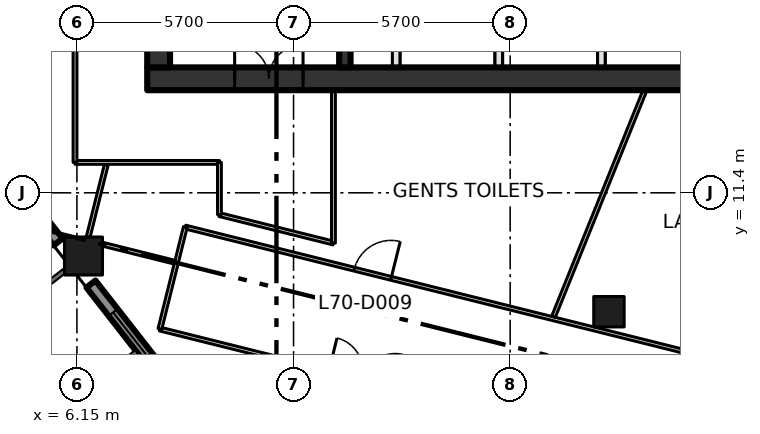
"""IFC4 building model, lengths in metres.
Left out: names, types, materials, properties, quantities, classifications, styles, units other than length and angle.
Written with IfcOpenShell. Run it as: python <this file> out.ifc"""

import sys

from ifc_helpers import new_model, si_unit, direction, frame, frame_2d, origin, origin_2d, place, context, subcontext, project, spatial, rectangle, extrude, element, fill, save


model = new_model("IFC4")
c1 = context("Model", 3, precision=1e-05, world=origin(), true_north=direction((0.0, 1.0)))
c2 = subcontext(c1, "Body", "Model", "MODEL_VIEW")
j1 = project(units=[si_unit("LENGTHUNIT", "METRE"), si_unit("PLANEANGLEUNIT", "RADIAN")], contexts=[c1])
p1 = place(None, origin())
s1 = spatial("IfcSite", under=j1, at=p1, CompositionType="ELEMENT")
p2 = place(p1, origin())
s2 = spatial("IfcBuilding", under=s1, at=p2, CompositionType="ELEMENT")
p3 = place(p2, frame((0.0, 0.0, 306.6)))
s3 = spatial("IfcBuildingStorey", under=s2, at=p3, CompositionType="ELEMENT", Elevation=306.6)
p4 = place(p3, frame((6.323, 9.737, 0.0), z_axis=(0.0, 0.0, 1.0), x_axis=(1.0, 0.0, 0.0)))
e1 = element("IfcColumn", 1, at=p4, inside=s3, PredefinedType="COLUMN", context=c2, shape_type="SweptSolid", body=[
    extrude(rectangle(XDim=1.0, YDim=1.0, at=origin_2d()), origin(), (0.0, 0.0, 1.0), 4.2),
])
p5 = place(p3, frame((20.149, 8.271, 0.0), z_axis=(0.0, 0.0, 1.0), x_axis=(1.0, 0.0, 0.0)))
e2 = element("IfcColumn", 2, at=p5, inside=s3, PredefinedType="COLUMN", context=c2, shape_type="SweptSolid", body=[
    extrude(rectangle(XDim=0.8, YDim=0.8, at=origin_2d()), origin(), (0.0, 0.0, 1.0), 4.2),
])
p6 = place(p3, frame((8.0, 14.4, -0.3), z_axis=(0.0, 0.0, 1.0), x_axis=(1.0, 0.0, 0.0)))
e3 = element("IfcWall", 3, at=p6, inside=s3, PredefinedType="SHEAR", context=c2, shape_type="SweptSolid", body=[
    extrude(rectangle(XDim=22.8, YDim=0.6, at=frame_2d((11.4, 0.0))), origin(), (0.0, 0.0, 1.0), 4.2),
])
p7 = place(p6, frame((2.3, 0.0, 0.3)))
e4 = element("IfcOpeningElement", 4, at=p7, cuts=e3, PredefinedType="OPENING", context=c2, shape_type="SweptSolid", body=[
    extrude(rectangle(XDim=1.8, YDim=2.1, at=frame_2d((0.9, 1.05))), frame((0.0, 0.31, 0.0), z_axis=(0.0, -1.0, 0.0), x_axis=(1.0, 0.0, 0.0)), (0.0, 0.0, 1.0), 0.62),
])
p8 = place(p3, frame((8.3, 14.7, -0.3), z_axis=(0.0, 0.0, 1.0), x_axis=(0.0, 1.0, 0.0)))
e5 = element("IfcWall", 5, at=p8, inside=s3, PredefinedType="SHEAR", context=c2, shape_type="SweptSolid", body=[
    extrude(rectangle(XDim=21.0, YDim=0.6, at=frame_2d((10.5, 0.0))), origin(), (0.0, 0.0, 1.0), 4.2),
])
p9 = place(p3, frame((13.2, 14.7, 0.0), z_axis=(0.0, 0.0, 1.0), x_axis=(0.0, 1.0, 0.0)))
e6 = element("IfcWall", 6, at=p9, inside=s3, PredefinedType="SHEAR", context=c2, shape_type="SweptSolid", body=[
    extrude(rectangle(XDim=21.0, YDim=0.3, at=frame_2d((10.5, 0.0))), origin(), (0.0, 0.0, 1.0), 3.9),
])
p10 = place(p9, frame((3.6, 0.0, 0.0)))
e7 = element("IfcOpeningElement", 7, at=p10, cuts=e6, PredefinedType="OPENING", context=c2, shape_type="SweptSolid", body=[
    extrude(rectangle(XDim=1.8, YDim=2.1, at=frame_2d((0.9, 1.05))), frame((0.0, 0.16, 0.0), z_axis=(0.0, -1.0, 0.0), x_axis=(1.0, 0.0, 0.0)), (0.0, 0.0, 1.0), 0.32),
])
p11 = place(p9, frame((11.7, 0.0, 0.0)))
e8 = element("IfcOpeningElement", 8, at=p11, cuts=e6, PredefinedType="OPENING", context=c2, shape_type="SweptSolid", body=[
    extrude(rectangle(XDim=1.2, YDim=2.1, at=frame_2d((0.6, 1.05))), frame((0.0, 0.16, 0.0), z_axis=(0.0, -1.0, 0.0), x_axis=(1.0, 0.0, 0.0)), (0.0, 0.0, 1.0), 0.32),
])
for number, where, z_axis, x_axis in (
    (9, (14.55, 14.7, 0.0), (0.0, 0.0, 1.0), (0.0, 1.0, 0.0)),
    (10, (17.25, 14.7, 0.0), (0.0, 0.0, 1.0), (0.0, 1.0, 0.0)),
    (11, (19.95, 14.7, 0.0), (0.0, 0.0, 1.0), (0.0, 1.0, 0.0)),
):
    element("IfcWall", number, at=place(p3, frame(where, z_axis=z_axis, x_axis=x_axis)), inside=s3, PredefinedType="SOLIDWALL", context=c2, shape_type="SweptSolid", body=[
        extrude(rectangle(XDim=2.9, YDim=0.2, at=frame_2d((1.45, 0.0))), origin(), (0.0, 0.0, 1.0), 3.9),
    ])
p12 = place(p3, frame((3.01, 13.491, 0.0), z_axis=(0.0, 0.0, 1.0), x_axis=(0.615713519567, -0.787970089421, 0.0)))
e12 = element("IfcWall", 12, at=p12, inside=s3, PredefinedType="SOLIDWALL", context=c2, shape_type="SweptSolid", body=[
    extrude(rectangle(XDim=4.296, YDim=0.3, at=frame_2d((2.148, 0.0))), origin(), (0.0, 0.0, 1.0), 3.2),
])
p13 = place(p12, frame((0.948, 0.0, 0.8)))
e13 = element("IfcOpeningElement", 13, at=p13, cuts=e12, PredefinedType="OPENING", context=c2, shape_type="SweptSolid", body=[
    extrude(rectangle(XDim=2.4, YDim=2.1, at=frame_2d((1.2, 1.05))), frame((0.0, 0.16, 0.0), z_axis=(0.0, -1.0, 0.0), x_axis=(1.0, 0.0, 0.0)), (0.0, 0.0, 1.0), 0.32),
])
p14 = place(p3, frame((6.519, 9.0, 0.0), z_axis=(0.0, 0.0, 1.0), x_axis=(0.615634121154, -0.788032124263, 0.0)))
e14 = element("IfcWall", 14, at=p14, inside=s3, PredefinedType="SOLIDWALL", context=c2, shape_type="SweptSolid", body=[
    extrude(rectangle(XDim=4.298, YDim=0.3, at=frame_2d((2.149, 0.0))), origin(), (0.0, 0.0, 1.0), 3.2),
])
p15 = place(p14, frame((0.949, 0.0, 0.8)))
e15 = element("IfcOpeningElement", 15, at=p15, cuts=e14, PredefinedType="OPENING", context=c2, shape_type="SweptSolid", body=[
    extrude(rectangle(XDim=2.4, YDim=2.1, at=frame_2d((1.2, 1.05))), frame((0.0, 0.16, 0.0), z_axis=(0.0, -1.0, 0.0), x_axis=(1.0, 0.0, 0.0)), (0.0, 0.0, 1.0), 0.32),
])
p16 = place(p3, frame((6.1, 12.2, 0.0), z_axis=(0.0, 0.0, 1.0), x_axis=(1.0, 0.0, 0.0)))
e16 = element("IfcWall", 16, at=p16, inside=s3, PredefinedType="PARTITIONING", context=c2, shape_type="SweptSolid", body=[
    extrude(rectangle(XDim=3.8, YDim=0.1, at=frame_2d((1.9, 0.0))), origin(), (0.0, 0.0, 1.0), 3.9),
])
p17 = place(p3, frame((6.1, 38.9, 0.0), z_axis=(0.0, 0.0, 1.0), x_axis=(0.0, -1.0, 0.0)))
e17 = element("IfcWall", 17, at=p17, inside=s3, PredefinedType="PARTITIONING", context=c2, shape_type="SweptSolid", body=[
    extrude(rectangle(XDim=26.7, YDim=0.1, at=frame_2d((13.35, 0.0))), origin(), (0.0, 0.0, 1.0), 3.9),
])
p18 = place(p17, frame((20.636, 0.0, 0.0)))
e18 = element("IfcOpeningElement", 18, at=p18, cuts=e17, PredefinedType="OPENING", context=c2, shape_type="SweptSolid", body=[
    extrude(rectangle(XDim=1.0, YDim=2.1, at=frame_2d((0.5, 1.05))), frame((0.0, 0.06, 0.0), z_axis=(0.0, -1.0, 0.0), x_axis=(1.0, 0.0, 0.0)), (0.0, 0.0, 1.0), 0.12),
])
p19 = place(p17, frame((6.88, 0.0, 0.0)))
e19 = element("IfcOpeningElement", 19, at=p19, cuts=e17, PredefinedType="OPENING", context=c2, shape_type="SweptSolid", body=[
    extrude(rectangle(XDim=1.8, YDim=2.1, at=frame_2d((0.9, 1.05))), frame((0.0, 0.06, 0.0), z_axis=(0.0, -1.0, 0.0), x_axis=(1.0, 0.0, 0.0)), (0.0, 0.0, 1.0), 0.12),
])
p20 = place(p3, frame((8.333, 7.815, 0.0), z_axis=(0.0, 0.0, 1.0), x_axis=(0.970306508913, -0.241878644697, 0.0)))
e20 = element("IfcWall", 20, at=p20, inside=s3, PredefinedType="PARTITIONING", context=c2, shape_type="SweptSolid", body=[
    extrude(rectangle(XDim=11.018, YDim=0.1, at=frame_2d((5.509, 0.0))), origin(), (0.0, 0.0, 1.0), 3.9),
])
p21 = place(p20, frame((4.58, 0.0, 0.0)))
e21 = element("IfcOpeningElement", 21, at=p21, cuts=e20, PredefinedType="OPENING", context=c2, shape_type="SweptSolid", body=[
    extrude(rectangle(XDim=1.8, YDim=2.1, at=frame_2d((0.9, 1.05))), frame((0.0, 0.06, 0.0), z_axis=(0.0, -1.0, 0.0), x_axis=(1.0, 0.0, 0.0)), (0.0, 0.0, 1.0), 0.12),
])
p22 = place(p3, frame((9.002, 10.499, 0.0), z_axis=(0.0, 0.0, 1.0), x_axis=(0.970298340477, -0.241911410372, 0.0)))
e22 = element("IfcWall", 22, at=p22, inside=s3, PredefinedType="PARTITIONING", context=c2, shape_type="SweptSolid", body=[
    extrude(rectangle(XDim=19.88, YDim=0.1, at=frame_2d((9.94, 0.0))), origin(), (0.0, 0.0, 1.0), 3.9),
])
p23 = place(p22, frame((4.58, 0.0, 0.0)))
e23 = element("IfcOpeningElement", 23, at=p23, cuts=e22, PredefinedType="OPENING", context=c2, shape_type="SweptSolid", body=[
    extrude(rectangle(XDim=1.0, YDim=2.1, at=frame_2d((0.5, 1.05))), frame((0.0, 0.06, 0.0), z_axis=(0.0, -1.0, 0.0), x_axis=(1.0, 0.0, 0.0)), (0.0, 0.0, 1.0), 0.12),
])
p24 = place(p22, frame((14.343, 0.0, 0.0)))
e24 = element("IfcOpeningElement", 24, at=p24, cuts=e22, PredefinedType="OPENING", context=c2, shape_type="SweptSolid", body=[
    extrude(rectangle(XDim=1.0, YDim=2.1, at=frame_2d((0.5, 1.05))), frame((0.0, 0.06, 0.0), z_axis=(0.0, -1.0, 0.0), x_axis=(1.0, 0.0, 0.0)), (0.0, 0.0, 1.0), 0.12),
])
p25 = place(p3, frame((9.002, 10.499, 0.0), z_axis=(0.0, 0.0, 1.0), x_axis=(-0.2418294893, -0.970318761081, 0.0)))
e25 = element("IfcWall", 25, at=p25, inside=s3, PredefinedType="PARTITIONING", context=c2, shape_type="SweptSolid", body=[
    extrude(rectangle(XDim=2.766, YDim=0.1, at=frame_2d((1.383, 0.0))), origin(), (0.0, 0.0, 1.0), 3.9),
])
p26 = place(p3, frame((9.9, 10.826, 0.0), z_axis=(0.0, 0.0, 1.0), x_axis=(0.970290953223, -0.241941038466, 0.0)))
e26 = element("IfcWall", 26, at=p26, inside=s3, PredefinedType="PARTITIONING", context=c2, shape_type="SweptSolid", body=[
    extrude(rectangle(XDim=3.092, YDim=0.1, at=frame_2d((1.546, 0.0))), origin(), (0.0, 0.0, 1.0), 3.9),
])
p27 = place(p3, frame((9.9, 12.2, 0.0), z_axis=(0.0, 0.0, 1.0), x_axis=(0.0, -1.0, 0.0)))
e27 = element("IfcWall", 27, at=p27, inside=s3, PredefinedType="PARTITIONING", context=c2, shape_type="SweptSolid", body=[
    extrude(rectangle(XDim=1.374, YDim=0.1, at=frame_2d((0.687, 0.0))), origin(), (0.0, 0.0, 1.0), 3.9),
])
p28 = place(p3, frame((12.9, 10.078, 0.0), z_axis=(0.0, 0.0, 1.0), x_axis=(0.0, 1.0, 0.0)))
e28 = element("IfcWall", 28, at=p28, inside=s3, PredefinedType="PARTITIONING", context=c2, shape_type="SweptSolid", body=[
    extrude(rectangle(XDim=4.022, YDim=0.1, at=frame_2d((2.011, 0.0))), origin(), (0.0, 0.0, 1.0), 3.9),
])
p29 = place(p3, frame((6.922, 12.138, 0.0), z_axis=(0.0, 0.0, 1.0), x_axis=(-0.242476987996, -0.970157157523, 0.0)))
e29 = element("IfcWall", 29, at=p29, inside=s3, PredefinedType="PARTITIONING", context=c2, shape_type="SweptSolid", body=[
    extrude(rectangle(XDim=1.959, YDim=0.1, at=frame_2d((0.98, 0.0))), origin(), (0.0, 0.0, 1.0), 3.9),
])
p30 = place(p3, frame((8.72, 9.575, 0.0), z_axis=(0.0, 0.0, 1.0), x_axis=(-0.970274576003, 0.242006708918, 0.0)))
e30 = element("IfcWall", 30, at=p30, inside=s3, PredefinedType="PARTITIONING", context=c2, shape_type="SweptSolid", body=[
    extrude(rectangle(XDim=1.955, YDim=0.1, at=frame_2d((0.978, 0.0))), origin(), (0.0, 0.0, 1.0), 3.9),
])
p31 = place(p3, frame((18.691, 8.142, 0.0), z_axis=(0.0, 0.0, 1.0), x_axis=(0.374447972071, 0.927247925968, 0.0)))
e31 = element("IfcWall", 31, at=p31, inside=s3, PredefinedType="PARTITIONING", context=c2, shape_type="SweptSolid", body=[
    extrude(rectangle(XDim=6.426, YDim=0.1, at=frame_2d((3.213, 0.0))), origin(), (0.0, 0.0, 1.0), 3.9),
])
p32 = place(p7, origin())
e32 = element("IfcDoor", 32, at=p32, inside=s3, OperationType="DOUBLE_DOOR_SINGLE_SWING", PredefinedType="DOOR", context=c2, shape_type="SweptSolid", body=[
    extrude(rectangle(XDim=1.8, YDim=2.1, at=frame_2d((0.9, 1.05))), frame((0.0, 0.025, 0.0), z_axis=(0.0, -1.0, 0.0), x_axis=(1.0, 0.0, 0.0)), (0.0, 0.0, 1.0), 0.05),
])
fill(e4, e32)
p33 = place(p15, origin())
e33 = element("IfcWindow", 33, at=p33, inside=s3, PartitioningType="DOUBLE_PANEL_VERTICAL", PredefinedType="WINDOW", context=c2, shape_type="SweptSolid", body=[
    extrude(rectangle(XDim=2.4, YDim=2.1, at=frame_2d((1.2, 1.05))), frame((0.0, 0.03, 0.0), z_axis=(0.0, -1.0, 0.0), x_axis=(1.0, 0.0, 0.0)), (0.0, 0.0, 1.0), 0.06),
])
fill(e15, e33)
p34 = place(p23, origin())
e34 = element("IfcDoor", 34, at=p34, inside=s3, OperationType="SINGLE_SWING_RIGHT", PredefinedType="DOOR", context=c2, shape_type="SweptSolid", body=[
    extrude(rectangle(XDim=1.0, YDim=2.1, at=frame_2d((0.5, 1.05))), frame((0.0, 0.025, 0.0), z_axis=(0.0, -1.0, 0.0), x_axis=(1.0, 0.0, 0.0)), (0.0, 0.0, 1.0), 0.05),
])
fill(e23, e34)
save(model, sys.argv[1])
